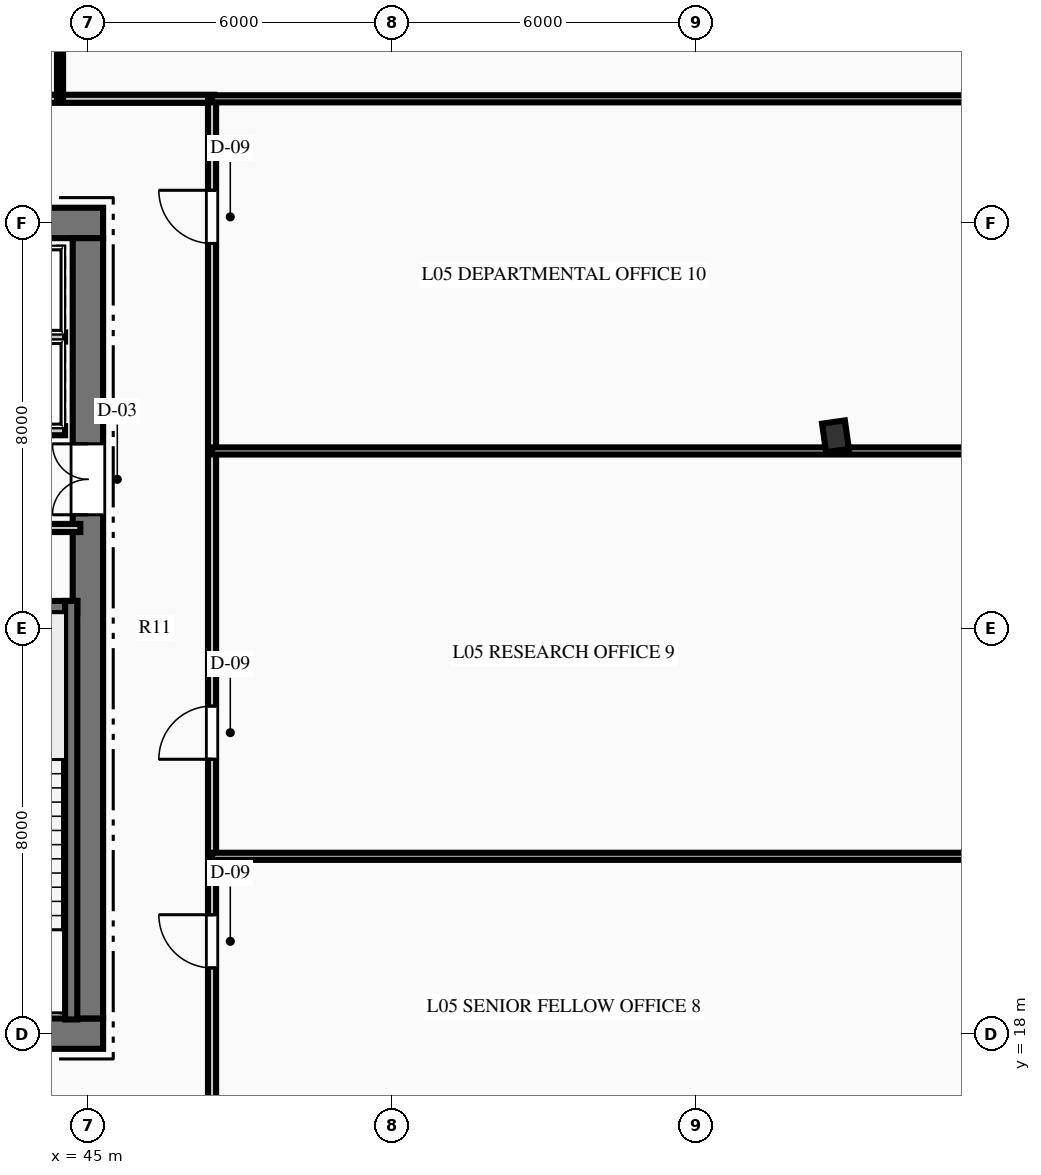
"""IFC4 building model, lengths in metres.
Left out: names, types, materials, properties, quantities, classifications, styles, units other than length and angle.
Written with IfcOpenShell. Run it as: python <this file> out.ifc"""

import sys

from ifc_helpers import new_model, si_unit, direction, frame, frame_2d, origin, origin_2d, place, context, subcontext, project, spatial, rectangle, i_section, extrude, element, fill, save


model = new_model("IFC4")
c1 = context("Model", 3, precision=1e-05, world=origin(), true_north=direction((0.0, 1.0)))
c2 = subcontext(c1, "Body", "Model", "MODEL_VIEW")
j1 = project(units=[si_unit("LENGTHUNIT", "METRE"), si_unit("PLANEANGLEUNIT", "RADIAN")], contexts=[c1])
p1 = place(None, origin())
s1 = spatial("IfcSite", under=j1, at=p1, CompositionType="ELEMENT")
p2 = place(p1, origin())
s2 = spatial("IfcBuilding", under=s1, at=p2, CompositionType="ELEMENT")
p3 = place(p2, frame((0.0, 0.0, 28.2)))
s3 = spatial("IfcBuildingStorey", under=s2, at=p3, CompositionType="ELEMENT", Elevation=28.2)
p4 = place(p3, frame((26.7, 18.0, 0.0), z_axis=(0.0, 0.0, 1.0), x_axis=(1.0, 0.0, 0.0)))
e1 = element("IfcWall", 1, at=p4, inside=s3, PredefinedType="SHEAR", context=c2, shape_type="SweptSolid", body=[
    extrude(rectangle(XDim=18.6, YDim=0.6, at=frame_2d((9.3, 0.0))), origin(), (0.0, 0.0, 1.0), 4.5),
])
p5 = place(p4, frame((7.4, 0.0, 0.0)))
e2 = element("IfcOpeningElement", 2, at=p5, cuts=e1, PredefinedType="OPENING", context=c2, shape_type="SweptSolid", body=[
    extrude(rectangle(XDim=1.1, YDim=2.15, at=frame_2d((0.55, 1.075))), frame((0.0, 0.31, 0.0), z_axis=(0.0, -1.0, 0.0), x_axis=(1.0, 0.0, 0.0)), (0.0, 0.0, 1.0), 0.62),
])
p6 = place(p4, frame((10.1, 0.0, 0.0)))
e3 = element("IfcOpeningElement", 3, at=p6, cuts=e1, PredefinedType="OPENING", context=c2, shape_type="SweptSolid", body=[
    extrude(rectangle(XDim=1.1, YDim=2.15, at=frame_2d((0.55, 1.075))), frame((0.0, 0.31, 0.0), z_axis=(0.0, -1.0, 0.0), x_axis=(1.0, 0.0, 0.0)), (0.0, 0.0, 1.0), 0.62),
])
p7 = place(p3, frame((26.7, 34.0, 0.0), z_axis=(0.0, 0.0, 1.0), x_axis=(1.0, 0.0, 0.0)))
e4 = element("IfcWall", 4, at=p7, inside=s3, PredefinedType="SHEAR", context=c2, shape_type="SweptSolid", body=[
    extrude(rectangle(XDim=18.6, YDim=0.6, at=frame_2d((9.3, 0.0))), origin(), (0.0, 0.0, 1.0), 4.5),
])
p8 = place(p7, frame((1.265, 0.0, 0.0)))
e5 = element("IfcOpeningElement", 5, at=p8, cuts=e4, PredefinedType="OPENING", context=c2, shape_type="SweptSolid", body=[
    extrude(rectangle(XDim=1.1, YDim=2.15, at=frame_2d((0.55, 1.075))), frame((0.0, 0.31, 0.0), z_axis=(0.0, -1.0, 0.0), x_axis=(1.0, 0.0, 0.0)), (0.0, 0.0, 1.0), 0.62),
])
p9 = place(p7, frame((3.515, 0.0, 0.0)))
e6 = element("IfcOpeningElement", 6, at=p9, cuts=e4, PredefinedType="OPENING", context=c2, shape_type="SweptSolid", body=[
    extrude(rectangle(XDim=1.1, YDim=2.15, at=frame_2d((0.55, 1.075))), frame((0.0, 0.31, 0.0), z_axis=(0.0, -1.0, 0.0), x_axis=(1.0, 0.0, 0.0)), (0.0, 0.0, 1.0), 0.62),
])
p10 = place(p7, frame((13.985, 0.0, 0.0)))
e7 = element("IfcOpeningElement", 7, at=p10, cuts=e4, PredefinedType="OPENING", context=c2, shape_type="SweptSolid", body=[
    extrude(rectangle(XDim=1.1, YDim=2.15, at=frame_2d((0.55, 1.075))), frame((0.0, 0.31, 0.0), z_axis=(0.0, -1.0, 0.0), x_axis=(1.0, 0.0, 0.0)), (0.0, 0.0, 1.0), 0.62),
])
p11 = place(p7, frame((16.235, 0.0, 0.0)))
e8 = element("IfcOpeningElement", 8, at=p11, cuts=e4, PredefinedType="OPENING", context=c2, shape_type="SweptSolid", body=[
    extrude(rectangle(XDim=1.1, YDim=2.15, at=frame_2d((0.55, 1.075))), frame((0.0, 0.31, 0.0), z_axis=(0.0, -1.0, 0.0), x_axis=(1.0, 0.0, 0.0)), (0.0, 0.0, 1.0), 0.62),
])
p12 = place(p3, frame((45.0, 18.3, 0.0), z_axis=(0.0, 0.0, 1.0), x_axis=(0.0, 1.0, 0.0)))
e9 = element("IfcWall", 9, at=p12, inside=s3, PredefinedType="SHEAR", context=c2, shape_type="SweptSolid", body=[
    extrude(rectangle(XDim=15.4, YDim=0.6, at=frame_2d((7.7, 0.0))), origin(), (0.0, 0.0, 1.0), 4.5),
])
p13 = place(p12, frame((9.94, 0.0, 0.0)))
e10 = element("IfcOpeningElement", 10, at=p13, cuts=e9, PredefinedType="OPENING", context=c2, shape_type="SweptSolid", body=[
    extrude(rectangle(XDim=1.4, YDim=2.2, at=frame_2d((0.7, 1.1))), frame((0.0, 0.31, 0.0), z_axis=(0.0, -1.0, 0.0), x_axis=(1.0, 0.0, 0.0)), (0.0, 0.0, 1.0), 0.62),
])
p14 = place(p3, frame((40.81, 26.42, 0.0), z_axis=(0.0, 0.0, 1.0), x_axis=(1.0, 0.0, 0.0)))
e11 = element("IfcWall", 11, at=p14, inside=s3, PredefinedType="SHEAR", context=c2, shape_type="SweptSolid", body=[
    extrude(rectangle(XDim=3.98, YDim=0.24, at=frame_2d((1.99, 0.0))), origin(), (0.0, 0.0, 1.0), 4.5),
])
p15 = place(p3, frame((44.67, 18.28, 0.0), z_axis=(0.0, 0.0, 1.0), x_axis=(0.0, 1.0, 0.0)))
e12 = element("IfcWall", 12, at=p15, inside=s3, PredefinedType="SHEAR", context=c2, shape_type="SweptSolid", body=[
    extrude(rectangle(XDim=8.26, YDim=0.24, at=frame_2d((4.13, 0.0))), origin(), (0.0, 0.0, 1.0), 4.5),
])
p16 = place(p3, frame((59.753, 29.789, 0.0), z_axis=(0.0, 0.0, 1.0), x_axis=(0.990146240249, 0.140037219771, 0.0)))
e13 = element("IfcColumn", 13, at=p16, inside=s3, PredefinedType="COLUMN", context=c2, shape_type="SweptSolid", body=[
    extrude(i_section(OverallWidth=0.454, OverallDepth=0.569, WebThickness=0.078, FlangeThickness=0.125, at=origin_2d()), origin(), (0.0, 0.0, 1.0), 4.5),
])
p17 = place(p3, frame((40.8, 27.98, 0.0), z_axis=(0.0, 0.0, 1.0), x_axis=(1.0, 0.0, 0.0)))
e14 = element("IfcWall", 14, at=p17, inside=s3, PredefinedType="PARTITIONING", context=c2, shape_type="SweptSolid", body=[
    extrude(rectangle(XDim=4.05, YDim=0.16, at=frame_2d((2.025, 0.0))), origin(), (0.0, 0.0, 1.0), 4.19),
])
p18 = place(p17, frame((1.475, 0.0, 0.0)))
e15 = element("IfcOpeningElement", 15, at=p18, cuts=e14, PredefinedType="OPENING", context=c2, shape_type="SweptSolid", body=[
    extrude(rectangle(XDim=0.95, YDim=2.15, at=frame_2d((0.475, 1.075))), frame((0.0, 0.09, 0.0), z_axis=(0.0, -1.0, 0.0), x_axis=(1.0, 0.0, 0.0)), (0.0, 0.0, 1.0), 0.18),
])
p19 = place(p3, frame((40.12, 29.9, 0.0), z_axis=(0.0, 0.0, 1.0), x_axis=(1.0, 0.0, 0.0)))
e16 = element("IfcWall", 16, at=p19, inside=s3, PredefinedType="PARTITIONING", context=c2, shape_type="SweptSolid", body=[
    extrude(rectangle(XDim=4.43, YDim=0.18, at=frame_2d((2.215, 0.0))), origin(), (0.0, 0.0, 1.0), 4.19),
])
p20 = place(p19, frame((0.565, 0.0, 0.0)))
e17 = element("IfcOpeningElement", 17, at=p20, cuts=e16, PredefinedType="OPENING", context=c2, shape_type="SweptSolid", body=[
    extrude(rectangle(XDim=1.1, YDim=2.15, at=frame_2d((0.55, 1.075))), frame((0.0, 0.1, 0.0), z_axis=(0.0, -1.0, 0.0), x_axis=(1.0, 0.0, 0.0)), (0.0, 0.0, 1.0), 0.2),
])
p21 = place(p19, frame((2.815, 0.0, 0.0)))
e18 = element("IfcOpeningElement", 18, at=p21, cuts=e16, PredefinedType="OPENING", context=c2, shape_type="SweptSolid", body=[
    extrude(rectangle(XDim=1.1, YDim=2.15, at=frame_2d((0.55, 1.075))), frame((0.0, 0.1, 0.0), z_axis=(0.0, -1.0, 0.0), x_axis=(1.0, 0.0, 0.0)), (0.0, 0.0, 1.0), 0.2),
])
p22 = place(p3, frame((40.12, 31.75, 0.0), z_axis=(0.0, 0.0, 1.0), x_axis=(1.0, 0.0, 0.0)))
e19 = element("IfcWall", 19, at=p22, inside=s3, PredefinedType="PARTITIONING", context=c2, shape_type="SweptSolid", body=[
    extrude(rectangle(XDim=4.43, YDim=0.18, at=frame_2d((2.215, 0.0))), origin(), (0.0, 0.0, 1.0), 4.19),
])
p23 = place(p3, frame((24.5, 36.45, 0.0), z_axis=(0.0, 0.0, 1.0), x_axis=(1.0, 0.0, 0.0)))
e20 = element("IfcWall", 20, at=p23, inside=s3, PredefinedType="PARTITIONING", context=c2, shape_type="SweptSolid", body=[
    extrude(rectangle(XDim=23.0, YDim=0.16, at=frame_2d((11.5, 0.0))), origin(), (0.0, 0.0, 1.0), 4.19),
])
p24 = place(p23, frame((13.75, 0.0, 0.0)))
e21 = element("IfcOpeningElement", 21, at=p24, cuts=e20, PredefinedType="OPENING", context=c2, shape_type="SweptSolid", body=[
    extrude(rectangle(XDim=0.9, YDim=2.15, at=frame_2d((0.45, 1.075))), frame((0.0, 0.09, 0.0), z_axis=(0.0, -1.0, 0.0), x_axis=(1.0, 0.0, 0.0)), (0.0, 0.0, 1.0), 0.18),
])
p25 = place(p23, frame((16.05, 0.0, 0.0)))
e22 = element("IfcOpeningElement", 22, at=p25, cuts=e20, PredefinedType="OPENING", context=c2, shape_type="SweptSolid", body=[
    extrude(rectangle(XDim=0.9, YDim=2.15, at=frame_2d((0.45, 1.075))), frame((0.0, 0.09, 0.0), z_axis=(0.0, -1.0, 0.0), x_axis=(1.0, 0.0, 0.0)), (0.0, 0.0, 1.0), 0.18),
])
p26 = place(p23, frame((18.3, 0.0, 0.0)))
e23 = element("IfcOpeningElement", 23, at=p26, cuts=e20, PredefinedType="OPENING", context=c2, shape_type="SweptSolid", body=[
    extrude(rectangle(XDim=1.0, YDim=2.15, at=frame_2d((0.5, 1.075))), frame((0.0, 0.09, 0.0), z_axis=(0.0, -1.0, 0.0), x_axis=(1.0, 0.0, 0.0)), (0.0, 0.0, 1.0), 0.18),
])
p27 = place(p23, frame((2.915, 0.0, 0.0)))
e24 = element("IfcOpeningElement", 24, at=p27, cuts=e20, PredefinedType="OPENING", context=c2, shape_type="SweptSolid", body=[
    extrude(rectangle(XDim=1.05, YDim=2.15, at=frame_2d((0.525, 1.075))), frame((0.0, 0.09, 0.0), z_axis=(0.0, -1.0, 0.0), x_axis=(1.0, 0.0, 0.0)), (0.0, 0.0, 1.0), 0.18),
])
p28 = place(p23, frame((11.335, 0.0, 0.0)))
e25 = element("IfcOpeningElement", 25, at=p28, cuts=e20, PredefinedType="OPENING", context=c2, shape_type="SweptSolid", body=[
    extrude(rectangle(XDim=1.05, YDim=2.15, at=frame_2d((0.525, 1.075))), frame((0.0, 0.09, 0.0), z_axis=(0.0, -1.0, 0.0), x_axis=(1.0, 0.0, 0.0)), (0.0, 0.0, 1.0), 0.18),
])
p29 = place(p3, frame((47.45, 15.55, 0.0), z_axis=(0.0, 0.0, 1.0), x_axis=(0.0, 1.0, 0.0)))
e26 = element("IfcWall", 26, at=p29, inside=s3, PredefinedType="PARTITIONING", context=c2, shape_type="SweptSolid", body=[
    extrude(rectangle(XDim=20.9, YDim=0.16, at=frame_2d((10.45, 0.0))), origin(), (0.0, 0.0, 1.0), 4.19),
])
p30 = place(p29, frame((3.747, 0.0, 0.0)))
e27 = element("IfcOpeningElement", 27, at=p30, cuts=e26, PredefinedType="OPENING", context=c2, shape_type="SweptSolid", body=[
    extrude(rectangle(XDim=1.05, YDim=2.15, at=frame_2d((0.525, 1.075))), frame((0.0, 0.09, 0.0), z_axis=(0.0, -1.0, 0.0), x_axis=(1.0, 0.0, 0.0)), (0.0, 0.0, 1.0), 0.18),
])
p31 = place(p29, frame((7.865, 0.0, 0.0)))
e28 = element("IfcOpeningElement", 28, at=p31, cuts=e26, PredefinedType="OPENING", context=c2, shape_type="SweptSolid", body=[
    extrude(rectangle(XDim=1.05, YDim=2.15, at=frame_2d((0.525, 1.075))), frame((0.0, 0.09, 0.0), z_axis=(0.0, -1.0, 0.0), x_axis=(1.0, 0.0, 0.0)), (0.0, 0.0, 1.0), 0.18),
])
p32 = place(p29, frame((18.045, 0.0, 0.0)))
e29 = element("IfcOpeningElement", 29, at=p32, cuts=e26, PredefinedType="OPENING", context=c2, shape_type="SweptSolid", body=[
    extrude(rectangle(XDim=1.05, YDim=2.15, at=frame_2d((0.525, 1.075))), frame((0.0, 0.09, 0.0), z_axis=(0.0, -1.0, 0.0), x_axis=(1.0, 0.0, 0.0)), (0.0, 0.0, 1.0), 0.18),
])
p33 = place(p3, frame((44.45, 36.45, 0.0), z_axis=(0.0, 0.0, 1.0), x_axis=(0.0, 1.0, 0.0)))
e30 = element("IfcWall", 30, at=p33, inside=s3, PredefinedType="PARTITIONING", context=c2, shape_type="SweptSolid", body=[
    extrude(rectangle(XDim=3.9, YDim=0.12, at=frame_2d((1.95, 0.0))), origin(), (0.0, 0.0, 1.0), 4.19),
])
for number, where, z_axis, x_axis in (
    (31, (47.45, 36.45, 0.0), (0.0, 0.0, 1.0), (1.0, 0.0, 0.0)),
    (32, (47.45, 21.5, 0.0), (0.0, 0.0, 1.0), (1.0, 0.0, 0.0)),
):
    element("IfcWall", number, at=place(p3, frame(where, z_axis=z_axis, x_axis=x_axis)), inside=s3, PredefinedType="PARTITIONING", context=c2, shape_type="SweptSolid", body=[
        extrude(rectangle(XDim=15.51, YDim=0.14, at=frame_2d((7.755, 0.0))), origin(), (0.0, 0.0, 1.0), 4.19),
    ])
p34 = place(p3, frame((47.45, 29.5, 0.0), z_axis=(0.0, 0.0, 1.0), x_axis=(1.0, 0.0, 0.0)))
e33 = element("IfcWall", 33, at=p34, inside=s3, PredefinedType="PARTITIONING", context=c2, shape_type="SweptSolid", body=[
    extrude(rectangle(XDim=15.51, YDim=0.14, at=frame_2d((7.755, 0.0))), origin(), (0.0, 0.0, 1.0), 3.489),
])
p35 = place(p13, origin())
e34 = element("IfcDoor", 34, at=p35, inside=s3, OperationType="DOUBLE_DOOR_SINGLE_SWING", PredefinedType="DOOR", context=c2, shape_type="SweptSolid", body=[
    extrude(rectangle(XDim=1.4, YDim=2.2, at=frame_2d((0.7, 1.1))), frame((0.0, 0.025, 0.0), z_axis=(0.0, -1.0, 0.0), x_axis=(1.0, 0.0, 0.0)), (0.0, 0.0, 1.0), 0.05),
])
fill(e10, e34)
p36 = place(p30, origin())
e35 = element("IfcDoor", 35, at=p36, inside=s3, OperationType="SINGLE_SWING_RIGHT", PredefinedType="DOOR", context=c2, shape_type="SweptSolid", body=[
    extrude(rectangle(XDim=1.05, YDim=2.15, at=frame_2d((0.525, 1.075))), frame((0.0, 0.025, 0.0), z_axis=(0.0, -1.0, 0.0), x_axis=(1.0, 0.0, 0.0)), (0.0, 0.0, 1.0), 0.05),
])
fill(e27, e35)
p37 = place(p31, origin())
e36 = element("IfcDoor", 36, at=p37, inside=s3, OperationType="SINGLE_SWING_LEFT", PredefinedType="DOOR", context=c2, shape_type="SweptSolid", body=[
    extrude(rectangle(XDim=1.05, YDim=2.15, at=frame_2d((0.525, 1.075))), frame((0.0, 0.025, 0.0), z_axis=(0.0, -1.0, 0.0), x_axis=(1.0, 0.0, 0.0)), (0.0, 0.0, 1.0), 0.05),
])
fill(e28, e36)
p38 = place(p32, origin())
e37 = element("IfcDoor", 37, at=p38, inside=s3, OperationType="SINGLE_SWING_RIGHT", PredefinedType="DOOR", context=c2, shape_type="SweptSolid", body=[
    extrude(rectangle(XDim=1.05, YDim=2.15, at=frame_2d((0.525, 1.075))), frame((0.0, 0.025, 0.0), z_axis=(0.0, -1.0, 0.0), x_axis=(1.0, 0.0, 0.0)), (0.0, 0.0, 1.0), 0.05),
])
fill(e29, e37)
save(model, sys.argv[1])
